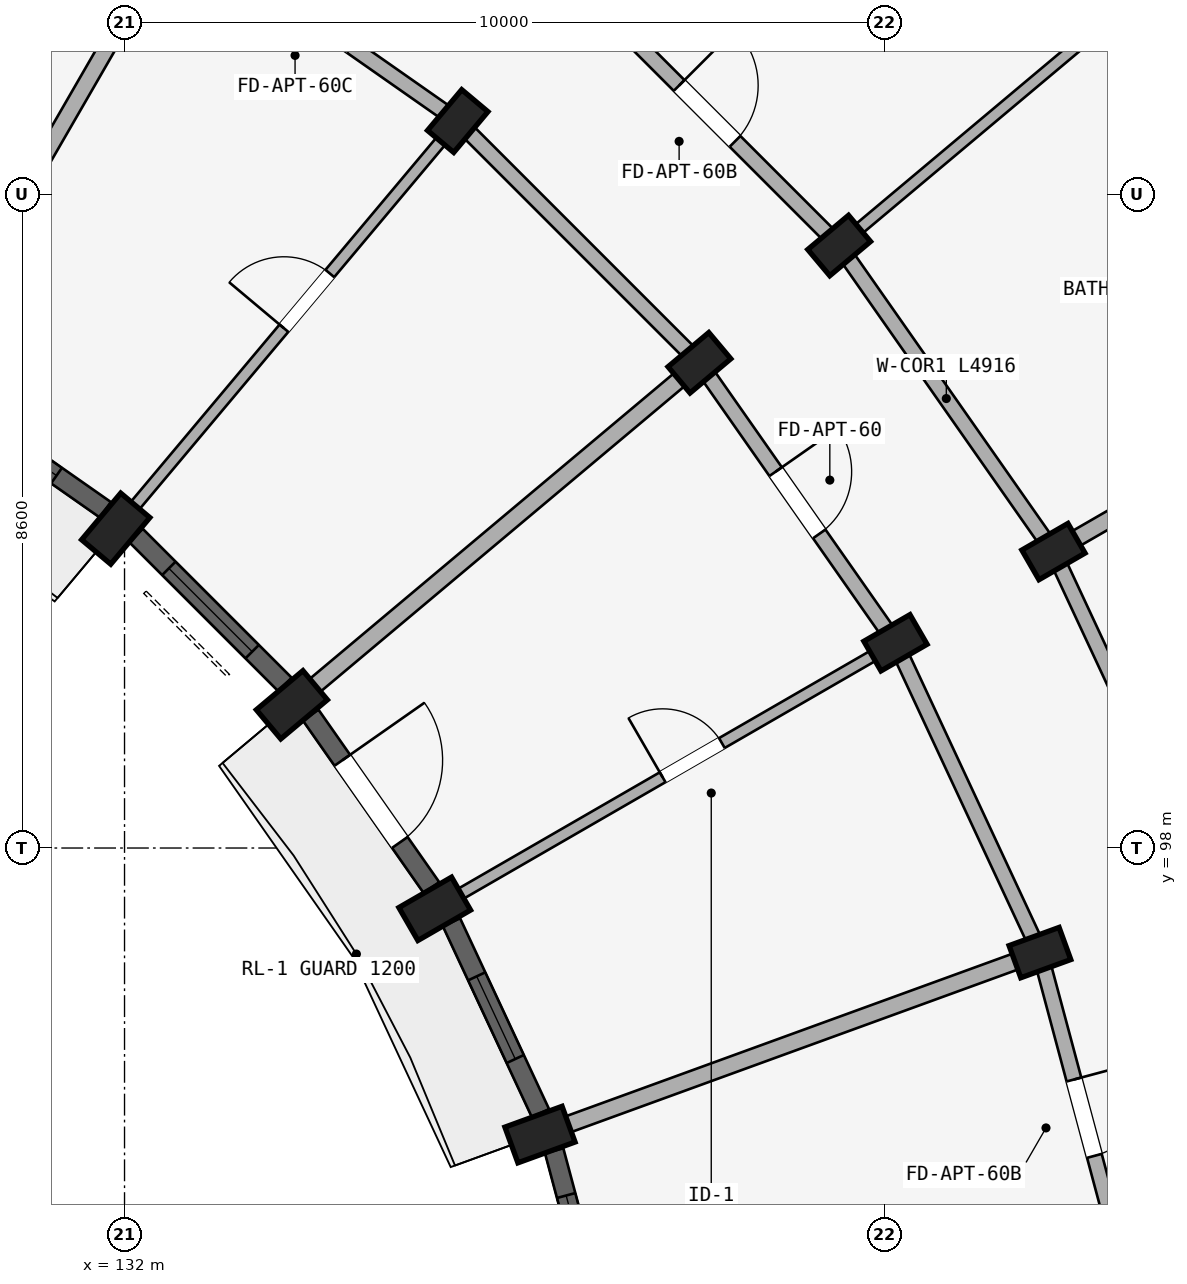
"""IFC4 building model, lengths in metres.
Left out: names, types, materials, properties, quantities, classifications, styles, units other than length and angle.
Written with IfcOpenShell. Run it as: python <this file> out.ifc"""

import sys

from ifc_helpers import new_model, si_unit, direction, frame, frame_2d, origin, origin_2d, place, context, subcontext, project, spatial, rectangle, extrude, element, fill, save


model = new_model("IFC4")
c1 = context("Model", 3, precision=1e-05, world=origin(), true_north=direction((0.0, 1.0)))
c2 = subcontext(c1, "Body", "Model", "MODEL_VIEW")
j1 = project(units=[si_unit("LENGTHUNIT", "METRE"), si_unit("PLANEANGLEUNIT", "RADIAN")], contexts=[c1])
p1 = place(None, origin())
s1 = spatial("IfcSite", under=j1, at=p1, CompositionType="ELEMENT")
p2 = place(p1, origin())
s2 = spatial("IfcBuilding", under=s1, at=p2, CompositionType="ELEMENT")
p3 = place(p2, frame((0.0, 0.0, 18.15)))
s3 = spatial("IfcBuildingStorey", under=s2, at=p3, CompositionType="ELEMENT", Elevation=18.15)
p4 = place(p3, frame((131.885, 102.202, 0.0), z_axis=(0.0, 0.0, 1.0), x_axis=(-0.766044443119, 0.642787609687, 0.0)))
e1 = element("IfcColumn", 1, at=p4, inside=s3, PredefinedType="COLUMN", context=c2, shape_type="SweptSolid", body=[
    extrude(rectangle(XDim=0.5, YDim=0.8, at=origin_2d()), origin(), (0.0, 0.0, 1.0), 2.93),
])
p5 = place(p3, frame((136.384, 107.564, 0.0), z_axis=(0.0, 0.0, 1.0), x_axis=(-0.766044443119, 0.642787609687, 0.0)))
e2 = element("IfcColumn", 2, at=p5, inside=s3, PredefinedType="COLUMN", context=c2, shape_type="SweptSolid", body=[
    extrude(rectangle(XDim=0.45, YDim=0.7, at=origin_2d()), origin(), (0.0, 0.0, 1.0), 2.93),
])
p6 = place(p3, frame((134.202, 99.885, 0.0), z_axis=(0.0, 0.0, 1.0), x_axis=(-0.642787609687, 0.766044443119, 0.0)))
e3 = element("IfcColumn", 3, at=p6, inside=s3, PredefinedType="COLUMN", context=c2, shape_type="SweptSolid", body=[
    extrude(rectangle(XDim=0.5, YDim=0.8, at=origin_2d()), origin(), (0.0, 0.0, 1.0), 2.93),
])
for number, where, z_axis, x_axis in (
    (4, (139.564, 104.384, 0.0), (0.0, 0.0, 1.0), (-0.643, 0.766, 0.0)),
    (5, (141.402, 105.927, 0.0), (0.0, 0.0, 1.0), (-0.643, 0.766, 0.0)),
):
    element("IfcColumn", number, at=place(p3, frame(where, z_axis=z_axis, x_axis=x_axis)), inside=s3, PredefinedType="COLUMN", context=c2, shape_type="SweptSolid", body=[
        extrude(rectangle(XDim=0.45, YDim=0.7, at=origin_2d()), origin(), (0.0, 0.0, 1.0), 2.93),
    ])
p7 = place(p3, frame((136.081, 97.2, 0.0), z_axis=(0.0, 0.0, 1.0), x_axis=(-0.5, 0.866025403784, 0.0)))
e6 = element("IfcColumn", 6, at=p7, inside=s3, PredefinedType="COLUMN", context=c2, shape_type="SweptSolid", body=[
    extrude(rectangle(XDim=0.5, YDim=0.8, at=origin_2d()), origin(), (0.0, 0.0, 1.0), 2.93),
])
for number, where, z_axis, x_axis in (
    (7, (142.144, 100.7, 0.0), (0.0, 0.0, 1.0), (-0.5, 0.866, 0.0)),
    (8, (144.222, 101.9, 0.0), (0.0, 0.0, 1.0), (-0.5, 0.866, 0.0)),
):
    element("IfcColumn", number, at=place(p3, frame(where, z_axis=z_axis, x_axis=x_axis)), inside=s3, PredefinedType="COLUMN", context=c2, shape_type="SweptSolid", body=[
        extrude(rectangle(XDim=0.45, YDim=0.7, at=origin_2d()), origin(), (0.0, 0.0, 1.0), 2.93),
    ])
p8 = place(p3, frame((137.466, 94.23, 0.0), z_axis=(0.0, 0.0, 1.0), x_axis=(-0.342020143326, 0.939692620786, 0.0)))
e9 = element("IfcColumn", 9, at=p8, inside=s3, PredefinedType="COLUMN", context=c2, shape_type="SweptSolid", body=[
    extrude(rectangle(XDim=0.5, YDim=0.8, at=origin_2d()), origin(), (0.0, 0.0, 1.0), 2.93),
])
p9 = place(p3, frame((144.044, 96.624, 0.0), z_axis=(0.0, 0.0, 1.0), x_axis=(-0.342020143326, 0.939692620786, 0.0)))
e10 = element("IfcColumn", 10, at=p9, inside=s3, PredefinedType="COLUMN", context=c2, shape_type="SweptSolid", body=[
    extrude(rectangle(XDim=0.45, YDim=0.7, at=origin_2d()), origin(), (0.0, 0.0, 1.0), 2.93),
])
p10 = place(p3, frame((132.7, 110.144, 0.0), z_axis=(0.0, 0.0, 1.0), x_axis=(0.819155404658, -0.573571637217, 0.0)))
e11 = element("IfcWall", 11, at=p10, inside=s3, PredefinedType="STANDARD", context=c2, shape_type="SweptSolid", body=[
    extrude(rectangle(XDim=4.497, YDim=0.2, at=frame_2d((2.249, 0.0))), origin(), (0.0, 0.0, 1.0), 2.372),
])
p11 = place(p10, frame((1.709, 0.0, 0.0)))
e12 = element("IfcOpeningElement", 12, at=p11, cuts=e11, PredefinedType="OPENING", context=c2, shape_type="SweptSolid", body=[
    extrude(rectangle(XDim=1.08, YDim=2.15, at=frame_2d((0.54, 1.075))), frame((0.0, 0.11, 0.0), z_axis=(0.0, -1.0, 0.0), x_axis=(1.0, 0.0, 0.0)), (0.0, 0.0, 1.0), 0.22),
])
p12 = place(p3, frame((136.384, 107.564, 0.0), z_axis=(0.0, 0.0, 1.0), x_axis=(0.707106781187, -0.707106781187, 0.0)))
e13 = element("IfcWall", 13, at=p12, inside=s3, PredefinedType="STANDARD", context=c2, shape_type="SweptSolid", body=[
    extrude(rectangle(XDim=4.497, YDim=0.2, at=frame_2d((2.249, 0.0))), origin(), (0.0, 0.0, 1.0), 2.372),
])
p13 = place(p3, frame((137.927, 109.402, 0.0), z_axis=(0.0, 0.0, 1.0), x_axis=(0.707106781187, -0.707106781187, 0.0)))
e14 = element("IfcWall", 14, at=p13, inside=s3, PredefinedType="STANDARD", context=c2, shape_type="SweptSolid", body=[
    extrude(rectangle(XDim=4.916, YDim=0.2, at=frame_2d((2.458, 0.0))), origin(), (0.0, 0.0, 1.0), 2.372),
])
p14 = place(p13, frame((1.938, 0.0, 0.0)))
e15 = element("IfcOpeningElement", 15, at=p14, cuts=e14, PredefinedType="OPENING", context=c2, shape_type="SweptSolid", body=[
    extrude(rectangle(XDim=1.04, YDim=2.15, at=frame_2d((0.52, 1.075))), frame((0.0, 0.11, 0.0), z_axis=(0.0, -1.0, 0.0), x_axis=(1.0, 0.0, 0.0)), (0.0, 0.0, 1.0), 0.22),
])
p15 = place(p3, frame((139.564, 104.384, 0.0), z_axis=(0.0, 0.0, 1.0), x_axis=(0.573571637217, -0.819155404658, 0.0)))
e16 = element("IfcWall", 16, at=p15, inside=s3, PredefinedType="STANDARD", context=c2, shape_type="SweptSolid", body=[
    extrude(rectangle(XDim=4.497, YDim=0.2, at=frame_2d((2.249, 0.0))), origin(), (0.0, 0.0, 1.0), 2.372),
])
p16 = place(p15, frame((1.749, 0.0, 0.0)))
e17 = element("IfcOpeningElement", 17, at=p16, cuts=e16, PredefinedType="OPENING", context=c2, shape_type="SweptSolid", body=[
    extrude(rectangle(XDim=1.0, YDim=2.15, at=frame_2d((0.5, 1.075))), frame((0.0, 0.11, 0.0), z_axis=(0.0, -1.0, 0.0), x_axis=(1.0, 0.0, 0.0)), (0.0, 0.0, 1.0), 0.22),
])
p17 = place(p3, frame((141.402, 105.927, 0.0), z_axis=(0.0, 0.0, 1.0), x_axis=(0.573592335331, -0.819140911474, 0.0)))
e18 = element("IfcWall", 18, at=p17, inside=s3, PredefinedType="STANDARD", context=c2, shape_type="SweptSolid", body=[
    extrude(rectangle(XDim=4.916, YDim=0.2, at=frame_2d((2.458, 0.0))), origin(), (0.0, 0.0, 1.0), 2.372),
])
p18 = place(p3, frame((142.144, 100.7, 0.0), z_axis=(0.0, 0.0, 1.0), x_axis=(0.422617978463, -0.906307919131, 0.0)))
e19 = element("IfcWall", 19, at=p18, inside=s3, PredefinedType="STANDARD", context=c2, shape_type="SweptSolid", body=[
    extrude(rectangle(XDim=4.497, YDim=0.2, at=frame_2d((2.249, 0.0))), origin(), (0.0, 0.0, 1.0), 2.372),
])
p19 = place(p3, frame((144.222, 101.9, 0.0), z_axis=(0.0, 0.0, 1.0), x_axis=(0.422629854778, -0.906302381024, 0.0)))
e20 = element("IfcWall", 20, at=p19, inside=s3, PredefinedType="STANDARD", context=c2, shape_type="SweptSolid", body=[
    extrude(rectangle(XDim=4.915, YDim=0.2, at=frame_2d((2.458, 0.0))), origin(), (0.0, 0.0, 1.0), 2.372),
])
p20 = place(p19, frame((1.918, 0.0, 0.0)))
e21 = element("IfcOpeningElement", 21, at=p20, cuts=e20, PredefinedType="OPENING", context=c2, shape_type="SweptSolid", body=[
    extrude(rectangle(XDim=1.08, YDim=2.15, at=frame_2d((0.54, 1.075))), frame((0.0, 0.11, 0.0), z_axis=(0.0, -1.0, 0.0), x_axis=(1.0, 0.0, 0.0)), (0.0, 0.0, 1.0), 0.22),
])
p21 = place(p3, frame((144.044, 96.624, 0.0), z_axis=(0.0, 0.0, 1.0), x_axis=(0.258787642463, -0.965934240054, 0.0)))
e22 = element("IfcWall", 22, at=p21, inside=s3, PredefinedType="STANDARD", context=c2, shape_type="SweptSolid", body=[
    extrude(rectangle(XDim=4.497, YDim=0.2, at=frame_2d((2.249, 0.0))), origin(), (0.0, 0.0, 1.0), 2.372),
])
p22 = place(p21, frame((1.729, 0.0, 0.0)))
e23 = element("IfcOpeningElement", 23, at=p22, cuts=e22, PredefinedType="OPENING", context=c2, shape_type="SweptSolid", body=[
    extrude(rectangle(XDim=1.04, YDim=2.15, at=frame_2d((0.52, 1.075))), frame((0.0, 0.11, 0.0), z_axis=(0.0, -1.0, 0.0), x_axis=(1.0, 0.0, 0.0)), (0.0, 0.0, 1.0), 0.22),
])
p23 = place(p3, frame((129.3, 104.254, 0.0), z_axis=(0.0, 0.0, 1.0), x_axis=(0.499997969693, 0.866026575979, 0.0)))
e24 = element("IfcWall", 24, at=p23, inside=s3, PredefinedType="STANDARD", context=c2, shape_type="SweptSolid", body=[
    extrude(rectangle(XDim=6.75, YDim=0.22, at=frame_2d((3.375, 0.0))), origin(), (0.0, 0.0, 1.0), 2.372),
])
p24 = place(p3, frame((132.013, 102.355, 0.0), z_axis=(0.0, 0.0, 1.0), x_axis=(0.642784846501, 0.766046761698, 0.0)))
e25 = element("IfcWall", 25, at=p24, inside=s3, PredefinedType="PARTITIONING", context=c2, shape_type="SweptSolid", body=[
    extrude(rectangle(XDim=6.75, YDim=0.15, at=frame_2d((3.375, 0.0))), origin(), (0.0, 0.0, 1.0), 2.372),
])
p25 = place(p24, frame((3.242, 0.0, 0.0)))
e26 = element("IfcOpeningElement", 26, at=p25, cuts=e25, PredefinedType="OPENING", context=c2, shape_type="SweptSolid", body=[
    extrude(rectangle(XDim=0.94, YDim=2.1, at=frame_2d((0.47, 1.05))), frame((0.0, 0.085, 0.0), z_axis=(0.0, -1.0, 0.0), x_axis=(1.0, 0.0, 0.0)), (0.0, 0.0, 1.0), 0.17),
])
p26 = place(p3, frame((134.355, 100.013, 0.0), z_axis=(0.0, 0.0, 1.0), x_axis=(0.766046761698, 0.642784846501, 0.0)))
e27 = element("IfcWall", 27, at=p26, inside=s3, PredefinedType="STANDARD", context=c2, shape_type="SweptSolid", body=[
    extrude(rectangle(XDim=6.75, YDim=0.22, at=frame_2d((3.375, 0.0))), origin(), (0.0, 0.0, 1.0), 2.372),
])
p27 = place(p3, frame((141.479, 105.991, 0.0), z_axis=(0.0, 0.0, 1.0), x_axis=(0.766046835987, 0.642784757967, 0.0)))
e28 = element("IfcWall", 28, at=p27, inside=s3, PredefinedType="PARTITIONING", context=c2, shape_type="SweptSolid", body=[
    extrude(rectangle(XDim=17.42, YDim=0.15, at=frame_2d((8.71, 0.0))), origin(), (0.0, 0.0, 1.0), 2.372),
])
p28 = place(p27, frame((4.45, 0.0, 0.0)))
e29 = element("IfcOpeningElement", 29, at=p28, cuts=e28, PredefinedType="OPENING", context=c2, shape_type="SweptSolid", body=[
    extrude(rectangle(XDim=0.8, YDim=2.1, at=frame_2d((0.4, 1.05))), frame((0.0, 0.085, 0.0), z_axis=(0.0, -1.0, 0.0), x_axis=(1.0, 0.0, 0.0)), (0.0, 0.0, 1.0), 0.17),
])
p29 = place(p3, frame((136.254, 97.3, 0.0), z_axis=(0.0, 0.0, 1.0), x_axis=(0.866026575979, 0.499997969693, 0.0)))
e30 = element("IfcWall", 30, at=p29, inside=s3, PredefinedType="PARTITIONING", context=c2, shape_type="SweptSolid", body=[
    extrude(rectangle(XDim=6.75, YDim=0.15, at=frame_2d((3.375, 0.0))), origin(), (0.0, 0.0, 1.0), 2.372),
])
p30 = place(p29, frame((3.262, 0.0, 0.0)))
e31 = element("IfcOpeningElement", 31, at=p30, cuts=e30, PredefinedType="OPENING", context=c2, shape_type="SweptSolid", body=[
    extrude(rectangle(XDim=0.9, YDim=2.1, at=frame_2d((0.45, 1.05))), frame((0.0, 0.085, 0.0), z_axis=(0.0, -1.0, 0.0), x_axis=(1.0, 0.0, 0.0)), (0.0, 0.0, 1.0), 0.17),
])
p31 = place(p3, frame((144.309, 101.95, 0.0), z_axis=(0.0, 0.0, 1.0), x_axis=(0.866026648973, 0.499997843263, 0.0)))
e32 = element("IfcWall", 32, at=p31, inside=s3, PredefinedType="STANDARD", context=c2, shape_type="SweptSolid", body=[
    extrude(rectangle(XDim=17.42, YDim=0.22, at=frame_2d((8.71, 0.0))), origin(), (0.0, 0.0, 1.0), 2.372),
])
p32 = place(p3, frame((137.654, 94.298, 0.0), z_axis=(0.0, 0.0, 1.0), x_axis=(0.939696231917, 0.342010221662, 0.0)))
e33 = element("IfcWall", 33, at=p32, inside=s3, PredefinedType="STANDARD", context=c2, shape_type="SweptSolid", body=[
    extrude(rectangle(XDim=6.75, YDim=0.22, at=frame_2d((3.375, 0.0))), origin(), (0.0, 0.0, 1.0), 2.372),
])
p33 = place(p3, frame((129.479, 104.038, 0.0), z_axis=(0.0, 0.0, 1.0), x_axis=(0.819111815273, -0.573633885053, 0.0)))
e34 = element("IfcWall", 34, at=p33, inside=s3, PredefinedType="STANDARD", context=c2, shape_type="SweptSolid", body=[
    extrude(rectangle(XDim=2.77, YDim=0.25, at=frame_2d((1.385, 0.0))), origin(), (0.0, 0.0, 1.0), 2.422),
])
p34 = place(p33, frame((0.785, 0.0, 0.722)))
e35 = element("IfcOpeningElement", 35, at=p34, cuts=e34, PredefinedType="OPENING", context=c2, shape_type="SweptSolid", body=[
    extrude(rectangle(XDim=1.2, YDim=1.5, at=frame_2d((0.6, 0.75))), frame((0.0, 0.135, 0.0), z_axis=(0.0, -1.0, 0.0), x_axis=(1.0, 0.0, 0.0)), (0.0, 0.0, 1.0), 0.27),
])
p35 = place(p3, frame((132.152, 102.111, 0.0), z_axis=(0.0, 0.0, 1.0), x_axis=(0.707106781187, -0.707106781187, 0.0)))
e36 = element("IfcWall", 36, at=p35, inside=s3, PredefinedType="STANDARD", context=c2, shape_type="SweptSolid", body=[
    extrude(rectangle(XDim=2.77, YDim=0.25, at=frame_2d((1.385, 0.0))), origin(), (0.0, 0.0, 1.0), 2.422),
])
p36 = place(p35, frame((0.61, 0.0, 0.622)))
e37 = element("IfcOpeningElement", 37, at=p36, cuts=e36, PredefinedType="OPENING", context=c2, shape_type="SweptSolid", body=[
    extrude(rectangle(XDim=1.55, YDim=1.6, at=frame_2d((0.775, 0.8))), frame((0.0, 0.135, 0.0), z_axis=(0.0, -1.0, 0.0), x_axis=(1.0, 0.0, 0.0)), (0.0, 0.0, 1.0), 0.27),
])
p37 = place(p3, frame((134.449, 99.748, 0.0), z_axis=(0.0, 0.0, 1.0), x_axis=(0.573633885053, -0.819111815273, 0.0)))
e38 = element("IfcWall", 38, at=p37, inside=s3, PredefinedType="STANDARD", context=c2, shape_type="SweptSolid", body=[
    extrude(rectangle(XDim=2.77, YDim=0.25, at=frame_2d((1.385, 0.0))), origin(), (0.0, 0.0, 1.0), 2.422),
])
p38 = place(p37, frame((0.725, 0.0, 0.0)))
e39 = element("IfcOpeningElement", 39, at=p38, cuts=e38, PredefinedType="OPENING", context=c2, shape_type="SweptSolid", body=[
    extrude(rectangle(XDim=1.32, YDim=2.15, at=frame_2d((0.66, 1.075))), frame((0.0, 0.135, 0.0), z_axis=(0.0, -1.0, 0.0), x_axis=(1.0, 0.0, 0.0)), (0.0, 0.0, 1.0), 0.27),
])
p39 = place(p3, frame((136.302, 97.023, 0.0), z_axis=(0.0, 0.0, 1.0), x_axis=(0.422649007088, -0.906293449611, 0.0)))
e40 = element("IfcWall", 40, at=p39, inside=s3, PredefinedType="STANDARD", context=c2, shape_type="SweptSolid", body=[
    extrude(rectangle(XDim=2.77, YDim=0.25, at=frame_2d((1.385, 0.0))), origin(), (0.0, 0.0, 1.0), 2.422),
])
p40 = place(p39, frame((0.785, 0.0, 0.722)))
e41 = element("IfcOpeningElement", 41, at=p40, cuts=e40, PredefinedType="OPENING", context=c2, shape_type="SweptSolid", body=[
    extrude(rectangle(XDim=1.2, YDim=1.5, at=frame_2d((0.6, 0.75))), frame((0.0, 0.135, 0.0), z_axis=(0.0, -1.0, 0.0), x_axis=(1.0, 0.0, 0.0)), (0.0, 0.0, 1.0), 0.27),
])
p41 = place(p3, frame((137.653, 94.017, 0.0), z_axis=(0.0, 0.0, 1.0), x_axis=(0.25878161084, -0.965935855992, 0.0)))
e42 = element("IfcWall", 42, at=p41, inside=s3, PredefinedType="STANDARD", context=c2, shape_type="SweptSolid", body=[
    extrude(rectangle(XDim=2.77, YDim=0.25, at=frame_2d((1.385, 0.0))), origin(), (0.0, 0.0, 1.0), 2.422),
])
p42 = place(p41, frame((0.61, 0.0, 0.622)))
e43 = element("IfcOpeningElement", 43, at=p42, cuts=e42, PredefinedType="OPENING", context=c2, shape_type="SweptSolid", body=[
    extrude(rectangle(XDim=1.55, YDim=1.6, at=frame_2d((0.775, 0.8))), frame((0.0, 0.135, 0.0), z_axis=(0.0, -1.0, 0.0), x_axis=(1.0, 0.0, 0.0)), (0.0, 0.0, 1.0), 0.27),
])
p43 = place(p34, origin())
e44 = element("IfcWindow", 44, at=p43, inside=s3, PartitioningType="SINGLE_PANEL", PredefinedType="WINDOW", context=c2, shape_type="SweptSolid", body=[
    extrude(rectangle(XDim=1.2, YDim=1.5, at=frame_2d((0.6, 0.75))), frame((0.0, 0.03, 0.0), z_axis=(0.0, -1.0, 0.0), x_axis=(1.0, 0.0, 0.0)), (0.0, 0.0, 1.0), 0.06),
])
fill(e35, e44)
p44 = place(p36, origin())
e45 = element("IfcWindow", 45, at=p44, inside=s3, PartitioningType="DOUBLE_PANEL_VERTICAL", PredefinedType="WINDOW", context=c2, shape_type="SweptSolid", body=[
    extrude(rectangle(XDim=1.55, YDim=1.6, at=frame_2d((0.775, 0.8))), frame((0.0, 0.03, 0.0), z_axis=(0.0, -1.0, 0.0), x_axis=(1.0, 0.0, 0.0)), (0.0, 0.0, 1.0), 0.06),
])
fill(e37, e45)
p45 = place(p40, origin())
e46 = element("IfcWindow", 46, at=p45, inside=s3, PartitioningType="SINGLE_PANEL", PredefinedType="WINDOW", context=c2, shape_type="SweptSolid", body=[
    extrude(rectangle(XDim=1.2, YDim=1.5, at=frame_2d((0.6, 0.75))), frame((0.0, 0.03, 0.0), z_axis=(0.0, -1.0, 0.0), x_axis=(1.0, 0.0, 0.0)), (0.0, 0.0, 1.0), 0.06),
])
fill(e41, e46)
p46 = place(p42, origin())
e47 = element("IfcWindow", 47, at=p46, inside=s3, PartitioningType="DOUBLE_PANEL_VERTICAL", PredefinedType="WINDOW", context=c2, shape_type="SweptSolid", body=[
    extrude(rectangle(XDim=1.55, YDim=1.6, at=frame_2d((0.775, 0.8))), frame((0.0, 0.03, 0.0), z_axis=(0.0, -1.0, 0.0), x_axis=(1.0, 0.0, 0.0)), (0.0, 0.0, 1.0), 0.06),
])
fill(e43, e47)
p47 = place(p25, origin())
e48 = element("IfcDoor", 48, at=p47, inside=s3, OperationType="SINGLE_SWING_LEFT", PredefinedType="DOOR", context=c2, shape_type="SweptSolid", body=[
    extrude(rectangle(XDim=0.94, YDim=2.1, at=frame_2d((0.47, 1.05))), frame((0.0, 0.025, 0.0), z_axis=(0.0, -1.0, 0.0), x_axis=(1.0, 0.0, 0.0)), (0.0, 0.0, 1.0), 0.05),
])
fill(e26, e48)
p48 = place(p30, origin())
e49 = element("IfcDoor", 49, at=p48, inside=s3, OperationType="SINGLE_SWING_LEFT", PredefinedType="DOOR", context=c2, shape_type="SweptSolid", body=[
    extrude(rectangle(XDim=0.9, YDim=2.1, at=frame_2d((0.45, 1.05))), frame((0.0, 0.025, 0.0), z_axis=(0.0, -1.0, 0.0), x_axis=(1.0, 0.0, 0.0)), (0.0, 0.0, 1.0), 0.05),
])
fill(e31, e49)
p49 = place(p14, origin())
e50 = element("IfcDoor", 50, at=p49, inside=s3, OperationType="SINGLE_SWING_LEFT", PredefinedType="DOOR", context=c2, shape_type="SweptSolid", body=[
    extrude(rectangle(XDim=1.04, YDim=2.15, at=frame_2d((0.52, 1.075))), frame((0.0, 0.025, 0.0), z_axis=(0.0, -1.0, 0.0), x_axis=(1.0, 0.0, 0.0)), (0.0, 0.0, 1.0), 0.05),
])
fill(e15, e50)
p50 = place(p16, frame((1.0, 0.0, 0.0), z_axis=(0.0, 0.0, 1.0), x_axis=(-1.0, 0.0, 0.0)))
e51 = element("IfcDoor", 51, at=p50, inside=s3, OperationType="SINGLE_SWING_RIGHT", PredefinedType="DOOR", context=c2, shape_type="SweptSolid", body=[
    extrude(rectangle(XDim=1.0, YDim=2.15, at=frame_2d((0.5, 1.075))), frame((0.0, 0.025, 0.0), z_axis=(0.0, -1.0, 0.0), x_axis=(1.0, 0.0, 0.0)), (0.0, 0.0, 1.0), 0.05),
])
fill(e17, e51)
p51 = place(p22, origin())
e52 = element("IfcDoor", 52, at=p51, inside=s3, OperationType="SINGLE_SWING_LEFT", PredefinedType="DOOR", context=c2, shape_type="SweptSolid", body=[
    extrude(rectangle(XDim=1.04, YDim=2.15, at=frame_2d((0.52, 1.075))), frame((0.0, 0.025, 0.0), z_axis=(0.0, -1.0, 0.0), x_axis=(1.0, 0.0, 0.0)), (0.0, 0.0, 1.0), 0.05),
])
fill(e23, e52)
p52 = place(p38, frame((1.32, 0.0, 0.0), z_axis=(0.0, 0.0, 1.0), x_axis=(-1.0, 0.0, 0.0)))
e53 = element("IfcDoor", 53, at=p52, inside=s3, OperationType="SINGLE_SWING_RIGHT", PredefinedType="DOOR", context=c2, shape_type="SweptSolid", body=[
    extrude(rectangle(XDim=1.32, YDim=2.15, at=frame_2d((0.66, 1.075))), frame((0.0, 0.025, 0.0), z_axis=(0.0, -1.0, 0.0), x_axis=(1.0, 0.0, 0.0)), (0.0, 0.0, 1.0), 0.05),
])
fill(e39, e53)
save(model, sys.argv[1])
